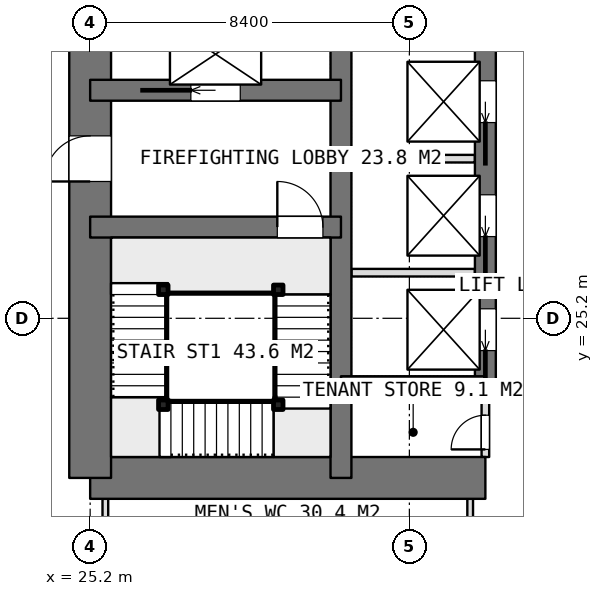
"""IFC4 building model, lengths in metres.
Left out: names, types, materials, properties, quantities, classifications, styles, units other than length and angle.
Written with IfcOpenShell. Run it as: python <this file> out.ifc"""

import sys

from ifc_helpers import new_model, si_unit, direction, frame, frame_2d, origin, origin_2d, place, context, subcontext, project, spatial, rectangle, extrude, element, fill, save


model = new_model("IFC4")
c1 = context("Model", 3, precision=1e-05, world=origin(), true_north=direction((0.0, 1.0)))
c2 = subcontext(c1, "Body", "Model", "MODEL_VIEW")
j1 = project(units=[si_unit("LENGTHUNIT", "METRE"), si_unit("PLANEANGLEUNIT", "RADIAN")], contexts=[c1])
p1 = place(None, origin())
s1 = spatial("IfcSite", under=j1, at=p1, CompositionType="ELEMENT")
p2 = place(p1, origin())
s2 = spatial("IfcBuilding", under=s1, at=p2, CompositionType="ELEMENT")
p3 = place(p2, frame((0.0, 0.0, 40.4)))
s3 = spatial("IfcBuildingStorey", under=s2, at=p3, CompositionType="ELEMENT", Elevation=40.4)
p4 = place(p3, frame((25.2, 21.0, 0.0), z_axis=(0.0, 0.0, 1.0), x_axis=(1.0, 0.0, 0.0)))
e1 = element("IfcWall", 1, at=p4, inside=s3, PredefinedType="SHEAR", context=c2, shape_type="SweptSolid", body=[
    extrude(rectangle(XDim=10.4, YDim=1.1, at=frame_2d((5.2, 0.0))), origin(), (0.0, 0.0, 1.0), 3.75),
])
p5 = place(p3, frame((25.2, 21.0, 0.0), z_axis=(0.0, 0.0, 1.0), x_axis=(0.0, 1.0, 0.0)))
e2 = element("IfcWall", 2, at=p5, inside=s3, PredefinedType="SHEAR", context=c2, shape_type="SweptSolid", body=[
    extrude(rectangle(XDim=25.2, YDim=1.1, at=frame_2d((12.6, 0.0))), origin(), (0.0, 0.0, 1.0), 3.75),
])
p6 = place(p5, frame((7.8, 0.0, 0.0)))
e3 = element("IfcOpeningElement", 3, at=p6, cuts=e2, PredefinedType="OPENING", context=c2, shape_type="SweptSolid", body=[
    extrude(rectangle(XDim=1.2, YDim=2.1, at=frame_2d((0.6, 1.05))), frame((0.0, 0.56, 0.0), z_axis=(0.0, -1.0, 0.0), x_axis=(1.0, 0.0, 0.0)), (0.0, 0.0, 1.0), 1.12),
])
p7 = place(p5, frame((14.25, 0.0, 0.0)))
e4 = element("IfcOpeningElement", 4, at=p7, cuts=e2, PredefinedType="OPENING", context=c2, shape_type="SweptSolid", body=[
    extrude(rectangle(XDim=0.9, YDim=2.1, at=frame_2d((0.45, 1.05))), frame((0.0, 0.56, 0.0), z_axis=(0.0, -1.0, 0.0), x_axis=(1.0, 0.0, 0.0)), (0.0, 0.0, 1.0), 1.12),
])
p8 = place(p5, frame((16.85, 0.0, 0.0)))
e5 = element("IfcOpeningElement", 5, at=p8, cuts=e2, PredefinedType="OPENING", context=c2, shape_type="SweptSolid", body=[
    extrude(rectangle(XDim=0.9, YDim=2.1, at=frame_2d((0.45, 1.05))), frame((0.0, 0.56, 0.0), z_axis=(0.0, -1.0, 0.0), x_axis=(1.0, 0.0, 0.0)), (0.0, 0.0, 1.0), 1.12),
])
p9 = place(p5, frame((19.075, 0.0, 0.0)))
e6 = element("IfcOpeningElement", 6, at=p9, cuts=e2, PredefinedType="OPENING", context=c2, shape_type="SweptSolid", body=[
    extrude(rectangle(XDim=1.2, YDim=2.1, at=frame_2d((0.6, 1.05))), frame((0.0, 0.56, 0.0), z_axis=(0.0, -1.0, 0.0), x_axis=(1.0, 0.0, 0.0)), (0.0, 0.0, 1.0), 1.12),
])
p10 = place(p3, frame((31.8, 21.0, 0.0), z_axis=(0.0, 0.0, 1.0), x_axis=(0.0, 1.0, 0.0)))
e7 = element("IfcWall", 7, at=p10, inside=s3, PredefinedType="SHEAR", context=c2, shape_type="SweptSolid", body=[
    extrude(rectangle(XDim=25.2, YDim=0.55, at=frame_2d((12.6, 0.0))), origin(), (0.0, 0.0, 1.0), 3.75),
])
p11 = place(p3, frame((35.6, 23.4, 0.0), z_axis=(0.0, 0.0, 1.0), x_axis=(0.0, 1.0, 0.0)))
e8 = element("IfcWall", 8, at=p11, inside=s3, PredefinedType="SHEAR", context=c2, shape_type="SweptSolid", body=[
    extrude(rectangle(XDim=18.0, YDim=0.55, at=frame_2d((9.0, 0.0))), origin(), (0.0, 0.0, 1.0), 3.75),
])
p12 = place(p11, frame((0.95, 0.0, 0.0)))
e9 = element("IfcOpeningElement", 9, at=p12, cuts=e8, PredefinedType="OPENING", context=c2, shape_type="SweptSolid", body=[
    extrude(rectangle(XDim=1.1, YDim=2.1, at=frame_2d((0.55, 1.05))), frame((0.0, 0.285, 0.0), z_axis=(0.0, -1.0, 0.0), x_axis=(1.0, 0.0, 0.0)), (0.0, 0.0, 1.0), 0.57),
])
p13 = place(p11, frame((3.95, 0.0, 0.0)))
e10 = element("IfcOpeningElement", 10, at=p13, cuts=e8, PredefinedType="OPENING", context=c2, shape_type="SweptSolid", body=[
    extrude(rectangle(XDim=1.1, YDim=2.1, at=frame_2d((0.55, 1.05))), frame((0.0, 0.285, 0.0), z_axis=(0.0, -1.0, 0.0), x_axis=(1.0, 0.0, 0.0)), (0.0, 0.0, 1.0), 0.57),
])
p14 = place(p11, frame((6.95, 0.0, 0.0)))
e11 = element("IfcOpeningElement", 11, at=p14, cuts=e8, PredefinedType="OPENING", context=c2, shape_type="SweptSolid", body=[
    extrude(rectangle(XDim=1.1, YDim=2.1, at=frame_2d((0.55, 1.05))), frame((0.0, 0.285, 0.0), z_axis=(0.0, -1.0, 0.0), x_axis=(1.0, 0.0, 0.0)), (0.0, 0.0, 1.0), 0.57),
])
p15 = place(p11, frame((9.95, 0.0, 0.0)))
e12 = element("IfcOpeningElement", 12, at=p15, cuts=e8, PredefinedType="OPENING", context=c2, shape_type="SweptSolid", body=[
    extrude(rectangle(XDim=1.1, YDim=2.1, at=frame_2d((0.55, 1.05))), frame((0.0, 0.285, 0.0), z_axis=(0.0, -1.0, 0.0), x_axis=(1.0, 0.0, 0.0)), (0.0, 0.0, 1.0), 0.57),
])
p16 = place(p11, frame((12.95, 0.0, 0.0)))
e13 = element("IfcOpeningElement", 13, at=p16, cuts=e8, PredefinedType="OPENING", context=c2, shape_type="SweptSolid", body=[
    extrude(rectangle(XDim=1.1, YDim=2.1, at=frame_2d((0.55, 1.05))), frame((0.0, 0.285, 0.0), z_axis=(0.0, -1.0, 0.0), x_axis=(1.0, 0.0, 0.0)), (0.0, 0.0, 1.0), 0.57),
])
p17 = place(p11, frame((15.95, 0.0, 0.0)))
e14 = element("IfcOpeningElement", 14, at=p17, cuts=e8, PredefinedType="OPENING", context=c2, shape_type="SweptSolid", body=[
    extrude(rectangle(XDim=1.1, YDim=2.1, at=frame_2d((0.55, 1.05))), frame((0.0, 0.285, 0.0), z_axis=(0.0, -1.0, 0.0), x_axis=(1.0, 0.0, 0.0)), (0.0, 0.0, 1.0), 0.57),
])
p18 = place(p3, frame((31.8, 23.4, 0.0), z_axis=(0.0, 0.0, 1.0), x_axis=(1.0, 0.0, 0.0)))
e15 = element("IfcWall", 15, at=p18, inside=s3, PredefinedType="SHEAR", context=c2, shape_type="SweptSolid", body=[
    extrude(rectangle(XDim=3.8, YDim=0.55, at=frame_2d((1.9, 0.0))), origin(), (0.0, 0.0, 1.0), 3.75),
])
p19 = place(p3, frame((25.2, 27.6, 0.0), z_axis=(0.0, 0.0, 1.0), x_axis=(1.0, 0.0, 0.0)))
e16 = element("IfcWall", 16, at=p19, inside=s3, PredefinedType="SHEAR", context=c2, shape_type="SweptSolid", body=[
    extrude(rectangle(XDim=6.6, YDim=0.55, at=frame_2d((3.3, 0.0))), origin(), (0.0, 0.0, 1.0), 3.75),
])
p20 = place(p19, frame((4.925, 0.0, 0.0)))
e17 = element("IfcOpeningElement", 17, at=p20, cuts=e16, PredefinedType="OPENING", context=c2, shape_type="SweptSolid", body=[
    extrude(rectangle(XDim=1.2, YDim=2.1, at=frame_2d((0.6, 1.05))), frame((0.0, 0.285, 0.0), z_axis=(0.0, -1.0, 0.0), x_axis=(1.0, 0.0, 0.0)), (0.0, 0.0, 1.0), 0.57),
])
p21 = place(p3, frame((25.2, 31.2, 0.0), z_axis=(0.0, 0.0, 1.0), x_axis=(1.0, 0.0, 0.0)))
e18 = element("IfcWall", 18, at=p21, inside=s3, PredefinedType="SHEAR", context=c2, shape_type="SweptSolid", body=[
    extrude(rectangle(XDim=6.6, YDim=0.55, at=frame_2d((3.3, 0.0))), origin(), (0.0, 0.0, 1.0), 3.75),
])
p22 = place(p21, frame((2.65, 0.0, 0.0)))
e19 = element("IfcOpeningElement", 19, at=p22, cuts=e18, PredefinedType="OPENING", context=c2, shape_type="SweptSolid", body=[
    extrude(rectangle(XDim=1.3, YDim=2.1, at=frame_2d((0.65, 1.05))), frame((0.0, 0.285, 0.0), z_axis=(0.0, -1.0, 0.0), x_axis=(1.0, 0.0, 0.0)), (0.0, 0.0, 1.0), 0.57),
])
for number, where, z_axis, x_axis in (
    (20, (32.075, 26.4, 0.0), (0.0, 0.0, 1.0), (1.0, 0.0, 0.0)),
    (21, (32.075, 29.4, 0.0), (0.0, 0.0, 1.0), (1.0, 0.0, 0.0)),
):
    element("IfcWall", number, at=place(p3, frame(where, z_axis=z_axis, x_axis=x_axis)), inside=s3, PredefinedType="PARTITIONING", context=c2, shape_type="SweptSolid", body=[
        extrude(rectangle(XDim=3.25, YDim=0.2, at=frame_2d((1.625, 0.0))), origin(), (0.0, 0.0, 1.0), 3.5),
    ])
p23 = place(p3, frame((35.6, 21.55, 0.0), z_axis=(0.0, 0.0, 1.0), x_axis=(0.0, 1.0, 0.0)))
e22 = element("IfcWall", 22, at=p23, inside=s3, PredefinedType="PARTITIONING", context=c2, shape_type="SweptSolid", body=[
    extrude(rectangle(XDim=1.575, YDim=0.2, at=frame_2d((0.788, 0.0))), origin(), (0.0, 0.0, 1.0), 3.5),
])
p24 = place(p23, frame((0.2, 0.0, 0.0)))
e23 = element("IfcOpeningElement", 23, at=p24, cuts=e22, PredefinedType="OPENING", context=c2, shape_type="SweptSolid", body=[
    extrude(rectangle(XDim=0.9, YDim=2.1, at=frame_2d((0.45, 1.05))), frame((0.0, 0.11, 0.0), z_axis=(0.0, -1.0, 0.0), x_axis=(1.0, 0.0, 0.0)), (0.0, 0.0, 1.0), 0.22),
])
for number, where, z_axis, x_axis in (
    (24, (25.6, 17.875, 0.0), (0.0, 0.0, 1.0), (0.0, 1.0, 0.0)),
    (25, (35.2, 17.875, 0.0), (0.0, 0.0, 1.0), (0.0, 1.0, 0.0)),
):
    element("IfcWall", number, at=place(p3, frame(where, z_axis=z_axis, x_axis=x_axis)), inside=s3, PredefinedType="PARTITIONING", context=c2, shape_type="SweptSolid", body=[
        extrude(rectangle(XDim=2.575, YDim=0.15, at=frame_2d((1.288, 0.0))), origin(), (0.0, 0.0, 1.0), 3.5),
    ])
for number, where, z_axis, x_axis in (
    (26, (30.15, 25.95, 0.0), (0.0, 0.0, 1.0), (1.0, 0.0, 0.0)),
    (27, (30.15, 22.925, 0.0), (0.0, 0.0, 1.0), (1.0, 0.0, 0.0)),
    (28, (27.125, 22.925, 0.0), (0.0, 0.0, 1.0), (1.0, 0.0, 0.0)),
    (29, (27.125, 25.95, 0.0), (0.0, 0.0, 1.0), (1.0, 0.0, 0.0)),
):
    element("IfcColumn", number, at=place(p3, frame(where, z_axis=z_axis, x_axis=x_axis)), inside=s3, PredefinedType="COLUMN", context=c2, shape_type="SweptSolid", body=[
        extrude(rectangle(XDim=0.25, YDim=0.25, at=origin_2d()), origin(), (0.0, 0.0, 1.0), 3.75),
    ])
p25 = place(p6, origin())
e30 = element("IfcDoor", 30, at=p25, inside=s3, OperationType="SINGLE_SWING_LEFT", PredefinedType="DOOR", context=c2, shape_type="SweptSolid", body=[
    extrude(rectangle(XDim=1.2, YDim=2.1, at=frame_2d((0.6, 1.05))), frame((0.0, 0.025, 0.0), z_axis=(0.0, -1.0, 0.0), x_axis=(1.0, 0.0, 0.0)), (0.0, 0.0, 1.0), 0.05),
])
fill(e3, e30)
p26 = place(p24, origin())
e31 = element("IfcDoor", 31, at=p26, inside=s3, OperationType="SINGLE_SWING_LEFT", PredefinedType="DOOR", context=c2, shape_type="SweptSolid", body=[
    extrude(rectangle(XDim=0.9, YDim=2.1, at=frame_2d((0.45, 1.05))), frame((0.0, 0.025, 0.0), z_axis=(0.0, -1.0, 0.0), x_axis=(1.0, 0.0, 0.0)), (0.0, 0.0, 1.0), 0.05),
])
fill(e23, e31)
p27 = place(p12, origin())
e32 = element("IfcDoor", 32, at=p27, inside=s3, OperationType="SLIDING_TO_LEFT", PredefinedType="USERDEFINED", context=c2, shape_type="SweptSolid", body=[
    extrude(rectangle(XDim=1.1, YDim=2.1, at=frame_2d((0.55, 1.05))), frame((0.0, 0.025, 0.0), z_axis=(0.0, -1.0, 0.0), x_axis=(1.0, 0.0, 0.0)), (0.0, 0.0, 1.0), 0.05),
])
fill(e9, e32)
p28 = place(p13, origin())
e33 = element("IfcDoor", 33, at=p28, inside=s3, OperationType="SLIDING_TO_LEFT", PredefinedType="USERDEFINED", context=c2, shape_type="SweptSolid", body=[
    extrude(rectangle(XDim=1.1, YDim=2.1, at=frame_2d((0.55, 1.05))), frame((0.0, 0.025, 0.0), z_axis=(0.0, -1.0, 0.0), x_axis=(1.0, 0.0, 0.0)), (0.0, 0.0, 1.0), 0.05),
])
fill(e10, e33)
p29 = place(p14, origin())
e34 = element("IfcDoor", 34, at=p29, inside=s3, OperationType="SLIDING_TO_LEFT", PredefinedType="USERDEFINED", context=c2, shape_type="SweptSolid", body=[
    extrude(rectangle(XDim=1.1, YDim=2.1, at=frame_2d((0.55, 1.05))), frame((0.0, 0.025, 0.0), z_axis=(0.0, -1.0, 0.0), x_axis=(1.0, 0.0, 0.0)), (0.0, 0.0, 1.0), 0.05),
])
fill(e11, e34)
p30 = place(p22, origin())
e35 = element("IfcDoor", 35, at=p30, inside=s3, OperationType="SLIDING_TO_LEFT", PredefinedType="USERDEFINED", context=c2, shape_type="SweptSolid", body=[
    extrude(rectangle(XDim=1.3, YDim=2.1, at=frame_2d((0.65, 1.05))), frame((0.0, 0.025, 0.0), z_axis=(0.0, -1.0, 0.0), x_axis=(1.0, 0.0, 0.0)), (0.0, 0.0, 1.0), 0.05),
])
fill(e19, e35)
p31 = place(p20, origin())
e36 = element("IfcDoor", 36, at=p31, inside=s3, OperationType="SINGLE_SWING_RIGHT", PredefinedType="DOOR", context=c2, shape_type="SweptSolid", body=[
    extrude(rectangle(XDim=1.2, YDim=2.1, at=frame_2d((0.6, 1.05))), frame((0.0, 0.025, 0.0), z_axis=(0.0, -1.0, 0.0), x_axis=(1.0, 0.0, 0.0)), (0.0, 0.0, 1.0), 0.05),
])
fill(e17, e36)
save(model, sys.argv[1])
